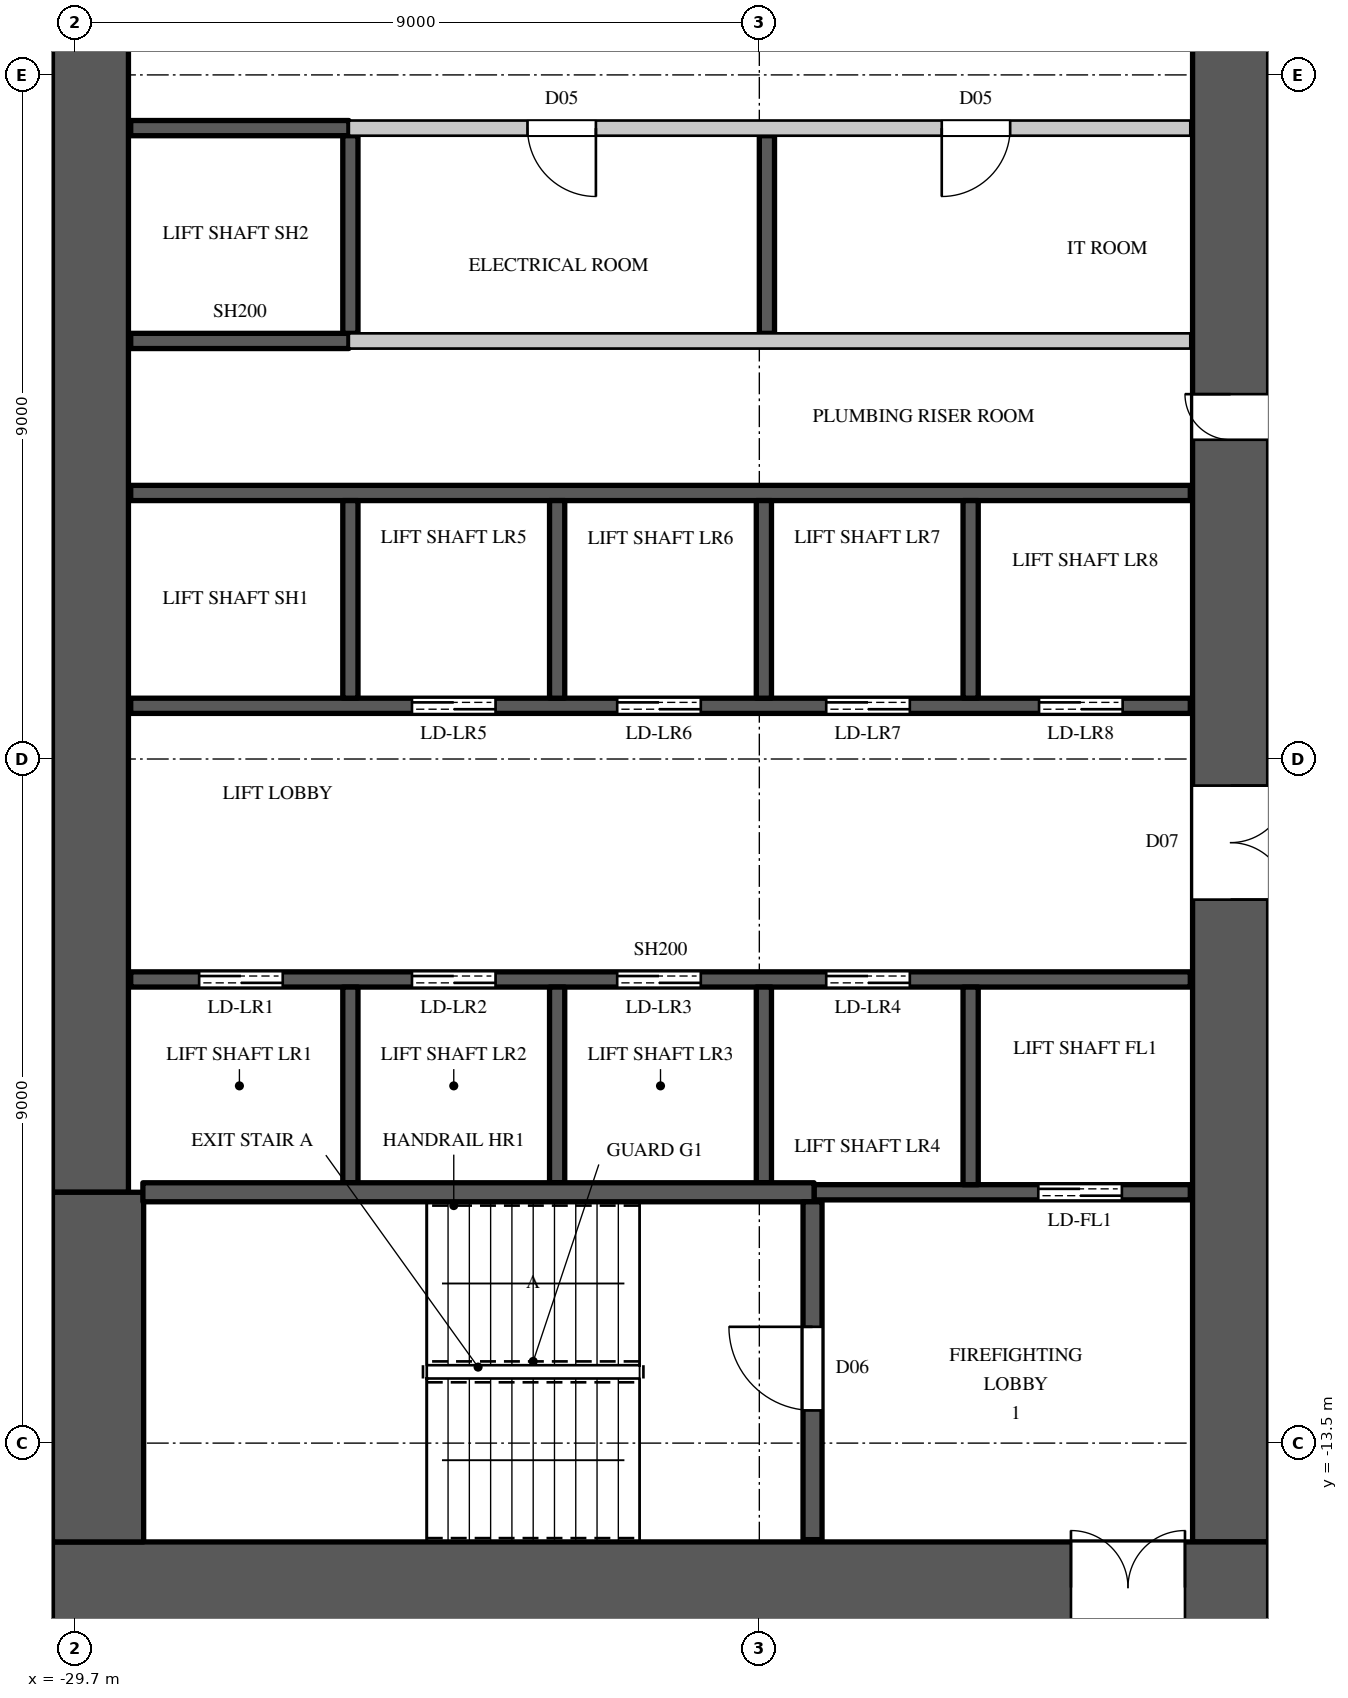
"""IFC4 building model, lengths in metres.
Left out: names, types, materials, properties, quantities, classifications, styles, units other than length and angle.
Written with IfcOpenShell. Run it as: python <this file> out.ifc"""

import sys

from ifc_helpers import new_model, si_unit, direction, frame, frame_2d, origin, place, context, subcontext, project, spatial, rectangle, extrude, element, fill, save


model = new_model("IFC4")
c1 = context("Model", 3, precision=1e-05, world=origin(), true_north=direction((0.0, 1.0)))
c2 = subcontext(c1, "Body", "Model", "MODEL_VIEW")
j1 = project(units=[si_unit("LENGTHUNIT", "METRE"), si_unit("PLANEANGLEUNIT", "RADIAN")], contexts=[c1])
p1 = place(None, origin())
s1 = spatial("IfcSite", under=j1, at=p1, CompositionType="ELEMENT")
p2 = place(p1, origin())
s2 = spatial("IfcBuilding", under=s1, at=p2, CompositionType="ELEMENT")
p3 = place(p2, frame((0.0, 0.0, 141.9)))
s3 = spatial("IfcBuildingStorey", under=s2, at=p3, CompositionType="ELEMENT", Elevation=141.9)
p4 = place(p3, frame((-30.0, -15.4, 0.0), z_axis=(0.0, 0.0, 1.0), x_axis=(1.0, 0.0, 0.0)))
e1 = element("IfcWall", 1, at=p4, inside=s3, PredefinedType="SHEAR", context=c2, shape_type="SweptSolid", body=[
    extrude(rectangle(XDim=16.0, YDim=1.2, at=frame_2d((8.0, 0.0))), origin(), (0.0, 0.0, 1.0), 3.6),
])
p5 = place(p4, frame((13.4, 0.0, 0.0)))
e2 = element("IfcOpeningElement", 2, at=p5, cuts=e1, PredefinedType="OPENING", context=c2, shape_type="SweptSolid", body=[
    extrude(rectangle(XDim=1.5, YDim=2.4, at=frame_2d((0.75, 1.2))), frame((0.0, 0.61, 0.0), z_axis=(0.0, -1.0, 0.0), x_axis=(1.0, 0.0, 0.0)), (0.0, 0.0, 1.0), 1.22),
])
p6 = place(p3, frame((-14.5, -14.8, 0.0), z_axis=(0.0, 0.0, 1.0), x_axis=(0.0, 1.0, 0.0)))
e3 = element("IfcWall", 3, at=p6, inside=s3, PredefinedType="SHEAR", context=c2, shape_type="SweptSolid", body=[
    extrude(rectangle(XDim=29.6, YDim=1.0, at=frame_2d((14.8, 0.0))), origin(), (0.0, 0.0, 1.0), 3.6),
])
p7 = place(p6, frame((8.45, 0.0, 0.0)))
e4 = element("IfcOpeningElement", 4, at=p7, cuts=e3, PredefinedType="OPENING", context=c2, shape_type="SweptSolid", body=[
    extrude(rectangle(XDim=1.5, YDim=2.4, at=frame_2d((0.75, 1.2))), frame((0.0, 0.51, 0.0), z_axis=(0.0, -1.0, 0.0), x_axis=(1.0, 0.0, 0.0)), (0.0, 0.0, 1.0), 1.02),
])
p8 = place(p6, frame((19.65, 0.0, 0.0)))
e5 = element("IfcOpeningElement", 5, at=p8, cuts=e3, PredefinedType="OPENING", context=c2, shape_type="SweptSolid", body=[
    extrude(rectangle(XDim=1.5, YDim=2.4, at=frame_2d((0.75, 1.2))), frame((0.0, 0.51, 0.0), z_axis=(0.0, -1.0, 0.0), x_axis=(1.0, 0.0, 0.0)), (0.0, 0.0, 1.0), 1.02),
])
p9 = place(p6, frame((14.5, 0.0, 0.0)))
e6 = element("IfcOpeningElement", 6, at=p9, cuts=e3, PredefinedType="OPENING", context=c2, shape_type="SweptSolid", body=[
    extrude(rectangle(XDim=0.6, YDim=2.0, at=frame_2d((0.3, 1.0))), frame((0.0, 0.51, 0.0), z_axis=(0.0, -1.0, 0.0), x_axis=(1.0, 0.0, 0.0)), (0.0, 0.0, 1.0), 1.02),
])
p10 = place(p3, frame((-29.5, -10.2, 0.0), z_axis=(0.0, 0.0, 1.0), x_axis=(0.0, 1.0, 0.0)))
e7 = element("IfcWall", 7, at=p10, inside=s3, PredefinedType="SHEAR", context=c2, shape_type="SweptSolid", body=[
    extrude(rectangle(XDim=20.4, YDim=1.0, at=frame_2d((10.2, 0.0))), origin(), (0.0, 0.0, 1.0), 3.6),
])
p11 = place(p3, frame((-29.4, -14.8, 0.0), z_axis=(0.0, 0.0, 1.0), x_axis=(0.0, 1.0, 0.0)))
e8 = element("IfcWall", 8, at=p11, inside=s3, PredefinedType="SHEAR", context=c2, shape_type="SweptSolid", body=[
    extrude(rectangle(XDim=4.6, YDim=1.2, at=frame_2d((2.3, 0.0))), origin(), (0.0, 0.0, 1.0), 3.6),
])
p12 = place(p3, frame((-26.1, 1.0, 0.0), z_axis=(0.0, 0.0, 1.0), x_axis=(1.0, 0.0, 0.0)))
e9 = element("IfcWall", 9, at=p12, inside=s3, PredefinedType="PARTITIONING", context=c2, shape_type="SweptSolid", body=[
    extrude(rectangle(XDim=11.07, YDim=0.2, at=frame_2d((5.535, 0.0))), origin(), (0.0, 0.0, 1.0), 3.3),
])
p13 = place(p3, frame((-26.1, 3.8, 0.0), z_axis=(0.0, 0.0, 1.0), x_axis=(1.0, 0.0, 0.0)))
e10 = element("IfcWall", 10, at=p13, inside=s3, PredefinedType="PARTITIONING", context=c2, shape_type="SweptSolid", body=[
    extrude(rectangle(XDim=11.07, YDim=0.2, at=frame_2d((5.535, 0.0))), origin(), (0.0, 0.0, 1.0), 3.3),
])
p14 = place(p13, frame((2.35, 0.0, 0.0)))
e11 = element("IfcOpeningElement", 11, at=p14, cuts=e10, PredefinedType="OPENING", context=c2, shape_type="SweptSolid", body=[
    extrude(rectangle(XDim=0.9, YDim=2.2, at=frame_2d((0.45, 1.1))), frame((0.0, 0.11, 0.0), z_axis=(0.0, -1.0, 0.0), x_axis=(1.0, 0.0, 0.0)), (0.0, 0.0, 1.0), 0.22),
])
p15 = place(p13, frame((7.8, 0.0, 0.0)))
e12 = element("IfcOpeningElement", 12, at=p15, cuts=e10, PredefinedType="OPENING", context=c2, shape_type="SweptSolid", body=[
    extrude(rectangle(XDim=0.9, YDim=2.2, at=frame_2d((0.45, 1.1))), frame((0.0, 0.11, 0.0), z_axis=(0.0, -1.0, 0.0), x_axis=(1.0, 0.0, 0.0)), (0.0, 0.0, 1.0), 0.22),
])
p16 = place(p3, frame((-20.6, 1.1, 0.0), z_axis=(0.0, 0.0, 1.0), x_axis=(0.0, 1.0, 0.0)))
e13 = element("IfcWall", 13, at=p16, inside=s3, PredefinedType="SHEAR", context=c2, shape_type="SweptSolid", body=[
    extrude(rectangle(XDim=2.6, YDim=0.2, at=frame_2d((1.3, 0.0))), origin(), (0.0, 0.0, 1.0), 2.15),
])
p17 = place(p3, frame((-28.97, -7.4, 0.0), z_axis=(0.0, 0.0, 1.0), x_axis=(1.0, 0.0, 0.0)))
e14 = element("IfcWall", 14, at=p17, inside=s3, PredefinedType="SHEAR", context=c2, shape_type="SweptSolid", body=[
    extrude(rectangle(XDim=13.94, YDim=0.2, at=frame_2d((6.97, 0.0))), origin(), (0.0, 0.0, 1.0), 3.3),
])
p18 = place(p17, frame((0.9, 0.0, 0.0)))
e15 = element("IfcOpeningElement", 15, at=p18, cuts=e14, PredefinedType="OPENING", context=c2, shape_type="SweptSolid", body=[
    extrude(rectangle(XDim=1.1, YDim=2.2, at=frame_2d((0.55, 1.1))), frame((0.0, 0.11, 0.0), z_axis=(0.0, -1.0, 0.0), x_axis=(1.0, 0.0, 0.0)), (0.0, 0.0, 1.0), 0.22),
])
p19 = place(p17, frame((3.7, 0.0, 0.0)))
e16 = element("IfcOpeningElement", 16, at=p19, cuts=e14, PredefinedType="OPENING", context=c2, shape_type="SweptSolid", body=[
    extrude(rectangle(XDim=1.1, YDim=2.2, at=frame_2d((0.55, 1.1))), frame((0.0, 0.11, 0.0), z_axis=(0.0, -1.0, 0.0), x_axis=(1.0, 0.0, 0.0)), (0.0, 0.0, 1.0), 0.22),
])
p20 = place(p17, frame((6.4, 0.0, 0.0)))
e17 = element("IfcOpeningElement", 17, at=p20, cuts=e14, PredefinedType="OPENING", context=c2, shape_type="SweptSolid", body=[
    extrude(rectangle(XDim=1.1, YDim=2.2, at=frame_2d((0.55, 1.1))), frame((0.0, 0.11, 0.0), z_axis=(0.0, -1.0, 0.0), x_axis=(1.0, 0.0, 0.0)), (0.0, 0.0, 1.0), 0.22),
])
p21 = place(p17, frame((9.15, 0.0, 0.0)))
e18 = element("IfcOpeningElement", 18, at=p21, cuts=e14, PredefinedType="OPENING", context=c2, shape_type="SweptSolid", body=[
    extrude(rectangle(XDim=1.1, YDim=2.2, at=frame_2d((0.55, 1.1))), frame((0.0, 0.11, 0.0), z_axis=(0.0, -1.0, 0.0), x_axis=(1.0, 0.0, 0.0)), (0.0, 0.0, 1.0), 0.22),
])
p22 = place(p3, frame((-28.97, -3.8, 0.0), z_axis=(0.0, 0.0, 1.0), x_axis=(1.0, 0.0, 0.0)))
e19 = element("IfcWall", 19, at=p22, inside=s3, PredefinedType="SHEAR", context=c2, shape_type="SweptSolid", body=[
    extrude(rectangle(XDim=13.94, YDim=0.2, at=frame_2d((6.97, 0.0))), origin(), (0.0, 0.0, 1.0), 3.3),
])
p23 = place(p22, frame((3.7, 0.0, 0.0)))
e20 = element("IfcOpeningElement", 20, at=p23, cuts=e19, PredefinedType="OPENING", context=c2, shape_type="SweptSolid", body=[
    extrude(rectangle(XDim=1.1, YDim=2.2, at=frame_2d((0.55, 1.1))), frame((0.0, 0.11, 0.0), z_axis=(0.0, -1.0, 0.0), x_axis=(1.0, 0.0, 0.0)), (0.0, 0.0, 1.0), 0.22),
])
p24 = place(p22, frame((6.4, 0.0, 0.0)))
e21 = element("IfcOpeningElement", 21, at=p24, cuts=e19, PredefinedType="OPENING", context=c2, shape_type="SweptSolid", body=[
    extrude(rectangle(XDim=1.1, YDim=2.2, at=frame_2d((0.55, 1.1))), frame((0.0, 0.11, 0.0), z_axis=(0.0, -1.0, 0.0), x_axis=(1.0, 0.0, 0.0)), (0.0, 0.0, 1.0), 0.22),
])
p25 = place(p22, frame((9.15, 0.0, 0.0)))
e22 = element("IfcOpeningElement", 22, at=p25, cuts=e19, PredefinedType="OPENING", context=c2, shape_type="SweptSolid", body=[
    extrude(rectangle(XDim=1.1, YDim=2.2, at=frame_2d((0.55, 1.1))), frame((0.0, 0.11, 0.0), z_axis=(0.0, -1.0, 0.0), x_axis=(1.0, 0.0, 0.0)), (0.0, 0.0, 1.0), 0.22),
])
p26 = place(p22, frame((11.95, 0.0, 0.0)))
e23 = element("IfcOpeningElement", 23, at=p26, cuts=e19, PredefinedType="OPENING", context=c2, shape_type="SweptSolid", body=[
    extrude(rectangle(XDim=1.1, YDim=2.2, at=frame_2d((0.55, 1.1))), frame((0.0, 0.11, 0.0), z_axis=(0.0, -1.0, 0.0), x_axis=(1.0, 0.0, 0.0)), (0.0, 0.0, 1.0), 0.22),
])
p27 = place(p3, frame((-28.97, -1.0, 0.0), z_axis=(0.0, 0.0, 1.0), x_axis=(1.0, 0.0, 0.0)))
e24 = element("IfcWall", 24, at=p27, inside=s3, PredefinedType="SHEAR", context=c2, shape_type="SweptSolid", body=[
    extrude(rectangle(XDim=13.94, YDim=0.2, at=frame_2d((6.97, 0.0))), origin(), (0.0, 0.0, 1.0), 3.3),
])
for number, where, z_axis, x_axis in (
    (25, (-28.97, 1.0, 0.0), (0.0, 0.0, 1.0), (1.0, 0.0, 0.0)),
    (26, (-28.97, 3.8, 0.0), (0.0, 0.0, 1.0), (1.0, 0.0, 0.0)),
):
    element("IfcWall", number, at=place(p3, frame(where, z_axis=z_axis, x_axis=x_axis)), inside=s3, PredefinedType="SHEAR", context=c2, shape_type="SweptSolid", body=[
        extrude(rectangle(XDim=2.87, YDim=0.2, at=frame_2d((1.435, 0.0))), origin(), (0.0, 0.0, 1.0), 3.3),
    ])
p28 = place(p3, frame((-26.08, -10.075, 0.0), z_axis=(0.0, 0.0, 1.0), x_axis=(0.0, 1.0, 0.0)))
e27 = element("IfcWall", 27, at=p28, inside=s3, PredefinedType="SHEAR", context=c2, shape_type="SweptSolid", body=[
    extrude(rectangle(XDim=2.575, YDim=0.2, at=frame_2d((1.288, 0.0))), origin(), (0.0, 0.0, 1.0), 3.6),
])
for number, where, z_axis, x_axis in (
    (28, (-26.08, -3.7, 0.0), (0.0, 0.0, 1.0), (0.0, 1.0, 0.0)),
    (29, (-26.08, 1.1, 0.0), (0.0, 0.0, 1.0), (0.0, 1.0, 0.0)),
):
    element("IfcWall", number, at=place(p3, frame(where, z_axis=z_axis, x_axis=x_axis)), inside=s3, PredefinedType="SHEAR", context=c2, shape_type="SweptSolid", body=[
        extrude(rectangle(XDim=2.6, YDim=0.2, at=frame_2d((1.3, 0.0))), origin(), (0.0, 0.0, 1.0), 3.6),
    ])
p29 = place(p3, frame((-23.36, -10.075, 0.0), z_axis=(0.0, 0.0, 1.0), x_axis=(0.0, 1.0, 0.0)))
e30 = element("IfcWall", 30, at=p29, inside=s3, PredefinedType="SHEAR", context=c2, shape_type="SweptSolid", body=[
    extrude(rectangle(XDim=2.575, YDim=0.2, at=frame_2d((1.288, 0.0))), origin(), (0.0, 0.0, 1.0), 3.6),
])
p30 = place(p3, frame((-23.36, -3.7, 0.0), z_axis=(0.0, 0.0, 1.0), x_axis=(0.0, 1.0, 0.0)))
e31 = element("IfcWall", 31, at=p30, inside=s3, PredefinedType="SHEAR", context=c2, shape_type="SweptSolid", body=[
    extrude(rectangle(XDim=2.6, YDim=0.2, at=frame_2d((1.3, 0.0))), origin(), (0.0, 0.0, 1.0), 3.6),
])
p31 = place(p3, frame((-20.64, -10.075, 0.0), z_axis=(0.0, 0.0, 1.0), x_axis=(0.0, 1.0, 0.0)))
e32 = element("IfcWall", 32, at=p31, inside=s3, PredefinedType="SHEAR", context=c2, shape_type="SweptSolid", body=[
    extrude(rectangle(XDim=2.575, YDim=0.2, at=frame_2d((1.288, 0.0))), origin(), (0.0, 0.0, 1.0), 3.6),
])
p32 = place(p3, frame((-20.64, -3.7, 0.0), z_axis=(0.0, 0.0, 1.0), x_axis=(0.0, 1.0, 0.0)))
e33 = element("IfcWall", 33, at=p32, inside=s3, PredefinedType="SHEAR", context=c2, shape_type="SweptSolid", body=[
    extrude(rectangle(XDim=2.6, YDim=0.2, at=frame_2d((1.3, 0.0))), origin(), (0.0, 0.0, 1.0), 3.6),
])
p33 = place(p3, frame((-19.98, -10.2, 0.0), z_axis=(0.0, 0.0, 1.0), x_axis=(1.0, 0.0, 0.0)))
e34 = element("IfcWall", 34, at=p33, inside=s3, PredefinedType="SHEAR", context=c2, shape_type="SweptSolid", body=[
    extrude(rectangle(XDim=4.95, YDim=0.2, at=frame_2d((2.475, 0.0))), origin(), (0.0, 0.0, 1.0), 3.3),
])
p34 = place(p33, frame((2.95, 0.0, 0.0)))
e35 = element("IfcOpeningElement", 35, at=p34, cuts=e34, PredefinedType="OPENING", context=c2, shape_type="SweptSolid", body=[
    extrude(rectangle(XDim=1.1, YDim=2.2, at=frame_2d((0.55, 1.1))), frame((0.0, 0.11, 0.0), z_axis=(0.0, -1.0, 0.0), x_axis=(1.0, 0.0, 0.0)), (0.0, 0.0, 1.0), 0.22),
])
p35 = place(p3, frame((-17.92, -10.1, 0.0), z_axis=(0.0, 0.0, 1.0), x_axis=(0.0, 1.0, 0.0)))
e36 = element("IfcWall", 36, at=p35, inside=s3, PredefinedType="SHEAR", context=c2, shape_type="SweptSolid", body=[
    extrude(rectangle(XDim=2.6, YDim=0.2, at=frame_2d((1.3, 0.0))), origin(), (0.0, 0.0, 1.0), 3.6),
])
p36 = place(p3, frame((-17.92, -3.7, 0.0), z_axis=(0.0, 0.0, 1.0), x_axis=(0.0, 1.0, 0.0)))
e37 = element("IfcWall", 37, at=p36, inside=s3, PredefinedType="SHEAR", context=c2, shape_type="SweptSolid", body=[
    extrude(rectangle(XDim=2.6, YDim=0.2, at=frame_2d((1.3, 0.0))), origin(), (0.0, 0.0, 1.0), 3.6),
])
p37 = place(p3, frame((-28.81, -10.2, 0.0), z_axis=(0.0, 0.0, 1.0), x_axis=(1.0, 0.0, 0.0)))
e38 = element("IfcWall", 38, at=p37, inside=s3, PredefinedType="SHEAR", context=c2, shape_type="SweptSolid", body=[
    extrude(rectangle(XDim=8.83, YDim=0.25, at=frame_2d((4.415, 0.0))), origin(), (0.0, 0.0, 1.0), 3.3),
])
p38 = place(p3, frame((-20.0, -14.77, 0.0), z_axis=(0.0, 0.0, 1.0), x_axis=(0.0, 1.0, 0.0)))
e39 = element("IfcWall", 39, at=p38, inside=s3, PredefinedType="SHEAR", context=c2, shape_type="SweptSolid", body=[
    extrude(rectangle(XDim=4.445, YDim=0.25, at=frame_2d((2.223, 0.0))), origin(), (0.0, 0.0, 1.0), 3.3),
])
p39 = place(p38, frame((1.7, 0.0, 0.0)))
e40 = element("IfcOpeningElement", 40, at=p39, cuts=e39, PredefinedType="OPENING", context=c2, shape_type="SweptSolid", body=[
    extrude(rectangle(XDim=1.1, YDim=2.2, at=frame_2d((0.55, 1.1))), frame((0.0, 0.135, 0.0), z_axis=(0.0, -1.0, 0.0), x_axis=(1.0, 0.0, 0.0)), (0.0, 0.0, 1.0), 0.27),
])
p40 = place(p39, origin())
e41 = element("IfcDoor", 41, at=p40, inside=s3, OperationType="SINGLE_SWING_RIGHT", PredefinedType="DOOR", context=c2, shape_type="SweptSolid", body=[
    extrude(rectangle(XDim=1.1, YDim=2.2, at=frame_2d((0.55, 1.1))), frame((0.0, 0.025, 0.0), z_axis=(0.0, -1.0, 0.0), x_axis=(1.0, 0.0, 0.0)), (0.0, 0.0, 1.0), 0.05),
])
fill(e40, e41)
p41 = place(p14, origin())
e42 = element("IfcDoor", 42, at=p41, inside=s3, OperationType="SINGLE_SWING_LEFT", PredefinedType="DOOR", context=c2, shape_type="SweptSolid", body=[
    extrude(rectangle(XDim=0.9, YDim=2.2, at=frame_2d((0.45, 1.1))), frame((0.0, 0.025, 0.0), z_axis=(0.0, -1.0, 0.0), x_axis=(1.0, 0.0, 0.0)), (0.0, 0.0, 1.0), 0.05),
])
fill(e11, e42)
p42 = place(p15, origin())
e43 = element("IfcDoor", 43, at=p42, inside=s3, OperationType="SINGLE_SWING_RIGHT", PredefinedType="DOOR", context=c2, shape_type="SweptSolid", body=[
    extrude(rectangle(XDim=0.9, YDim=2.2, at=frame_2d((0.45, 1.1))), frame((0.0, 0.025, 0.0), z_axis=(0.0, -1.0, 0.0), x_axis=(1.0, 0.0, 0.0)), (0.0, 0.0, 1.0), 0.05),
])
fill(e12, e43)
p43 = place(p18, origin())
e44 = element("IfcDoor", 44, at=p43, inside=s3, OperationType="DOUBLE_DOOR_SLIDING", PredefinedType="DOOR", context=c2, shape_type="SweptSolid", body=[
    extrude(rectangle(XDim=1.1, YDim=2.2, at=frame_2d((0.55, 1.1))), frame((0.0, 0.025, 0.0), z_axis=(0.0, -1.0, 0.0), x_axis=(1.0, 0.0, 0.0)), (0.0, 0.0, 1.0), 0.05),
])
fill(e15, e44)
p44 = place(p19, origin())
e45 = element("IfcDoor", 45, at=p44, inside=s3, OperationType="DOUBLE_DOOR_SLIDING", PredefinedType="DOOR", context=c2, shape_type="SweptSolid", body=[
    extrude(rectangle(XDim=1.1, YDim=2.2, at=frame_2d((0.55, 1.1))), frame((0.0, 0.025, 0.0), z_axis=(0.0, -1.0, 0.0), x_axis=(1.0, 0.0, 0.0)), (0.0, 0.0, 1.0), 0.05),
])
fill(e16, e45)
p45 = place(p20, origin())
e46 = element("IfcDoor", 46, at=p45, inside=s3, OperationType="DOUBLE_DOOR_SLIDING", PredefinedType="DOOR", context=c2, shape_type="SweptSolid", body=[
    extrude(rectangle(XDim=1.1, YDim=2.2, at=frame_2d((0.55, 1.1))), frame((0.0, 0.025, 0.0), z_axis=(0.0, -1.0, 0.0), x_axis=(1.0, 0.0, 0.0)), (0.0, 0.0, 1.0), 0.05),
])
fill(e17, e46)
p46 = place(p21, origin())
e47 = element("IfcDoor", 47, at=p46, inside=s3, OperationType="DOUBLE_DOOR_SLIDING", PredefinedType="DOOR", context=c2, shape_type="SweptSolid", body=[
    extrude(rectangle(XDim=1.1, YDim=2.2, at=frame_2d((0.55, 1.1))), frame((0.0, 0.025, 0.0), z_axis=(0.0, -1.0, 0.0), x_axis=(1.0, 0.0, 0.0)), (0.0, 0.0, 1.0), 0.05),
])
fill(e18, e47)
p47 = place(p34, origin())
e48 = element("IfcDoor", 48, at=p47, inside=s3, OperationType="DOUBLE_DOOR_SLIDING", PredefinedType="DOOR", context=c2, shape_type="SweptSolid", body=[
    extrude(rectangle(XDim=1.1, YDim=2.2, at=frame_2d((0.55, 1.1))), frame((0.0, 0.025, 0.0), z_axis=(0.0, -1.0, 0.0), x_axis=(1.0, 0.0, 0.0)), (0.0, 0.0, 1.0), 0.05),
])
fill(e35, e48)
p48 = place(p23, origin())
e49 = element("IfcDoor", 49, at=p48, inside=s3, OperationType="DOUBLE_DOOR_SLIDING", PredefinedType="DOOR", context=c2, shape_type="SweptSolid", body=[
    extrude(rectangle(XDim=1.1, YDim=2.2, at=frame_2d((0.55, 1.1))), frame((0.0, 0.025, 0.0), z_axis=(0.0, -1.0, 0.0), x_axis=(1.0, 0.0, 0.0)), (0.0, 0.0, 1.0), 0.05),
])
fill(e20, e49)
p49 = place(p24, origin())
e50 = element("IfcDoor", 50, at=p49, inside=s3, OperationType="DOUBLE_DOOR_SLIDING", PredefinedType="DOOR", context=c2, shape_type="SweptSolid", body=[
    extrude(rectangle(XDim=1.1, YDim=2.2, at=frame_2d((0.55, 1.1))), frame((0.0, 0.025, 0.0), z_axis=(0.0, -1.0, 0.0), x_axis=(1.0, 0.0, 0.0)), (0.0, 0.0, 1.0), 0.05),
])
fill(e21, e50)
p50 = place(p25, origin())
e51 = element("IfcDoor", 51, at=p50, inside=s3, OperationType="DOUBLE_DOOR_SLIDING", PredefinedType="DOOR", context=c2, shape_type="SweptSolid", body=[
    extrude(rectangle(XDim=1.1, YDim=2.2, at=frame_2d((0.55, 1.1))), frame((0.0, 0.025, 0.0), z_axis=(0.0, -1.0, 0.0), x_axis=(1.0, 0.0, 0.0)), (0.0, 0.0, 1.0), 0.05),
])
fill(e22, e51)
p51 = place(p26, origin())
e52 = element("IfcDoor", 52, at=p51, inside=s3, OperationType="DOUBLE_DOOR_SLIDING", PredefinedType="DOOR", context=c2, shape_type="SweptSolid", body=[
    extrude(rectangle(XDim=1.1, YDim=2.2, at=frame_2d((0.55, 1.1))), frame((0.0, 0.025, 0.0), z_axis=(0.0, -1.0, 0.0), x_axis=(1.0, 0.0, 0.0)), (0.0, 0.0, 1.0), 0.05),
])
fill(e23, e52)
p52 = place(p5, origin())
e53 = element("IfcDoor", 53, at=p52, inside=s3, OperationType="DOUBLE_DOOR_SINGLE_SWING", PredefinedType="DOOR", context=c2, shape_type="SweptSolid", body=[
    extrude(rectangle(XDim=1.5, YDim=2.4, at=frame_2d((0.75, 1.2))), frame((0.0, 0.025, 0.0), z_axis=(0.0, -1.0, 0.0), x_axis=(1.0, 0.0, 0.0)), (0.0, 0.0, 1.0), 0.05),
])
fill(e2, e53)
p53 = place(p7, origin())
e54 = element("IfcDoor", 54, at=p53, inside=s3, OperationType="DOUBLE_DOOR_SINGLE_SWING", PredefinedType="DOOR", context=c2, shape_type="SweptSolid", body=[
    extrude(rectangle(XDim=1.5, YDim=2.4, at=frame_2d((0.75, 1.2))), frame((0.0, -0.445, 0.0), z_axis=(0.0, -1.0, 0.0), x_axis=(1.0, 0.0, 0.0)), (0.0, 0.0, 1.0), 0.05),
])
fill(e4, e54)
p54 = place(p9, origin())
e55 = element("IfcDoor", 55, at=p54, inside=s3, OperationType="SINGLE_SWING_RIGHT", PredefinedType="DOOR", context=c2, shape_type="SweptSolid", body=[
    extrude(rectangle(XDim=0.6, YDim=2.0, at=frame_2d((0.3, 1.0))), frame((0.0, 0.495, 0.0), z_axis=(0.0, -1.0, 0.0), x_axis=(1.0, 0.0, 0.0)), (0.0, 0.0, 1.0), 0.05),
])
fill(e6, e55)
save(model, sys.argv[1])
